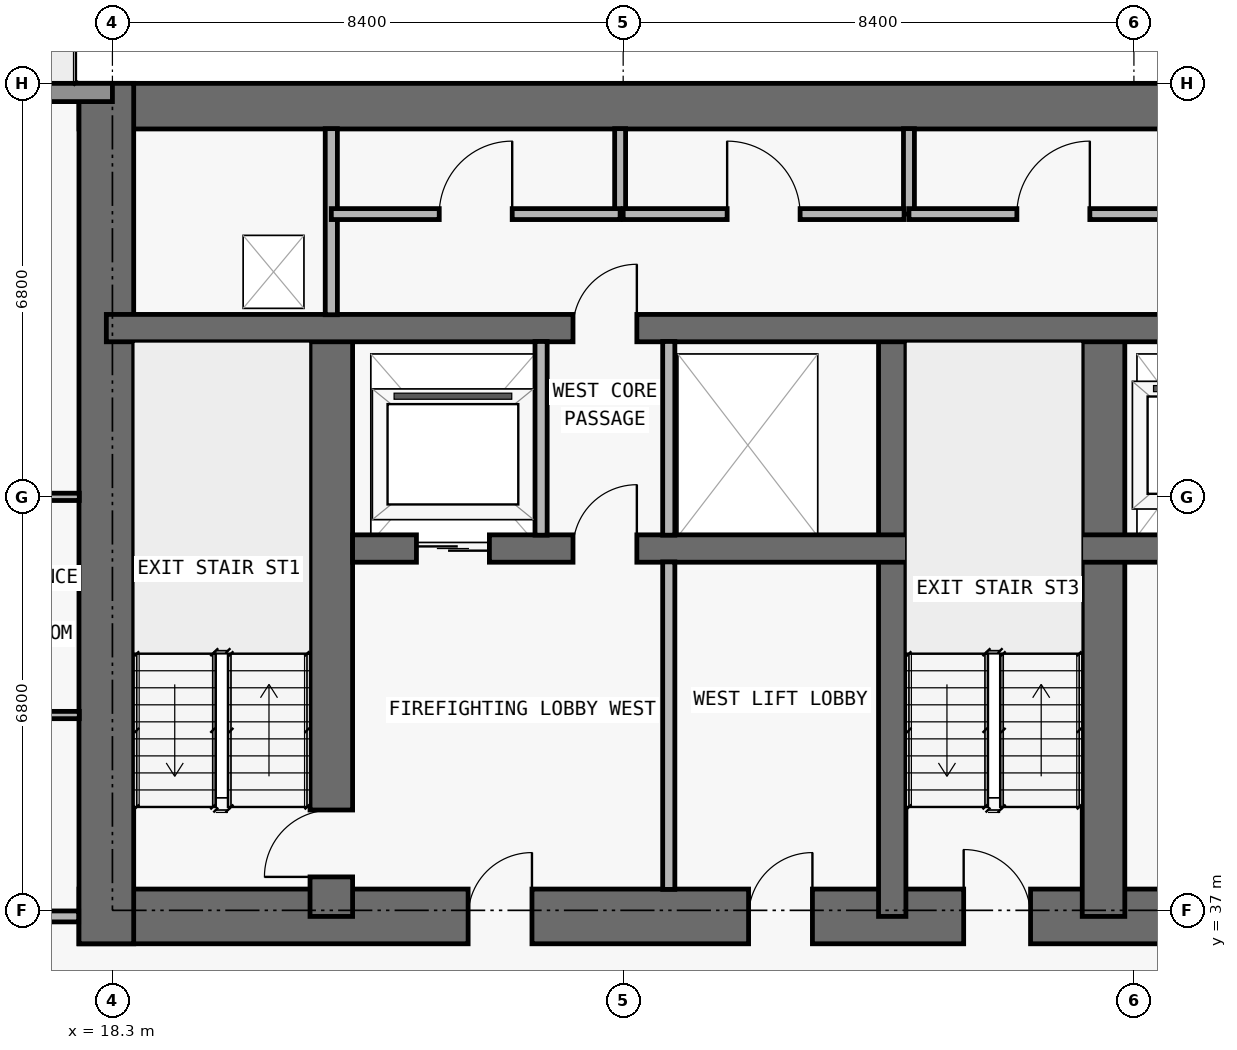
"""IFC4 building model, lengths in metres.
Left out: names, types, materials, properties, quantities, classifications, styles, units other than length and angle.
Written with IfcOpenShell. Run it as: python <this file> out.ifc"""

import sys

from ifc_helpers import new_model, si_unit, direction, frame, frame_2d, origin, place, context, subcontext, project, spatial, rectangle, extrude, element, fill, save


model = new_model("IFC4")
c1 = context("Model", 3, precision=1e-05, world=origin(), true_north=direction((0.0, 1.0)))
c2 = subcontext(c1, "Body", "Model", "MODEL_VIEW")
j1 = project(units=[si_unit("LENGTHUNIT", "METRE"), si_unit("PLANEANGLEUNIT", "RADIAN")], contexts=[c1])
p1 = place(None, origin())
s1 = spatial("IfcSite", under=j1, at=p1, CompositionType="ELEMENT")
p2 = place(p1, origin())
s2 = spatial("IfcBuilding", under=s1, at=p2, CompositionType="ELEMENT")
p3 = place(p2, frame((0.0, 0.0, 46.5)))
s3 = spatial("IfcBuildingStorey", under=s2, at=p3, CompositionType="ELEMENT", Elevation=46.5)
p4 = place(p3, frame((17.75, 36.9, 0.0), z_axis=(0.0, 0.0, 1.0), x_axis=(1.0, 0.0, 0.0)))
e1 = element("IfcWall", 1, at=p4, inside=s3, PredefinedType="SHEAR", context=c2, shape_type="SweptSolid", body=[
    extrude(rectangle(XDim=42.3, YDim=0.9, at=frame_2d((21.15, 0.0))), origin(), (0.0, 0.0, 1.0), 3.05),
])
p5 = place(p4, frame((14.55, 0.0, 0.0)))
e2 = element("IfcOpeningElement", 2, at=p5, cuts=e1, PredefinedType="OPENING", context=c2, shape_type="SweptSolid", body=[
    extrude(rectangle(XDim=1.1, YDim=2.15, at=frame_2d((0.55, 1.075))), frame((0.0, 0.46, 0.0), z_axis=(0.0, -1.0, 0.0), x_axis=(1.0, 0.0, 0.0)), (0.0, 0.0, 1.0), 0.92),
])
p6 = place(p4, frame((6.4, 0.0, 0.0)))
e3 = element("IfcOpeningElement", 3, at=p6, cuts=e1, PredefinedType="OPENING", context=c2, shape_type="SweptSolid", body=[
    extrude(rectangle(XDim=1.05, YDim=2.15, at=frame_2d((0.525, 1.075))), frame((0.0, 0.46, 0.0), z_axis=(0.0, -1.0, 0.0), x_axis=(1.0, 0.0, 0.0)), (0.0, 0.0, 1.0), 0.92),
])
p7 = place(p4, frame((34.9, 0.0, 0.0)))
e4 = element("IfcOpeningElement", 4, at=p7, cuts=e1, PredefinedType="OPENING", context=c2, shape_type="SweptSolid", body=[
    extrude(rectangle(XDim=1.05, YDim=2.15, at=frame_2d((0.525, 1.075))), frame((0.0, 0.46, 0.0), z_axis=(0.0, -1.0, 0.0), x_axis=(1.0, 0.0, 0.0)), (0.0, 0.0, 1.0), 0.92),
])
p8 = place(p4, frame((11.012, 0.0, 0.0)))
e5 = element("IfcOpeningElement", 5, at=p8, cuts=e1, PredefinedType="OPENING", context=c2, shape_type="SweptSolid", body=[
    extrude(rectangle(XDim=1.05, YDim=2.15, at=frame_2d((0.525, 1.075))), frame((0.0, 0.46, 0.0), z_axis=(0.0, -1.0, 0.0), x_axis=(1.0, 0.0, 0.0)), (0.0, 0.0, 1.0), 0.92),
])
p9 = place(p4, frame((24.25, 0.0, 0.0)))
e6 = element("IfcOpeningElement", 6, at=p9, cuts=e1, PredefinedType="OPENING", context=c2, shape_type="SweptSolid", body=[
    extrude(rectangle(XDim=1.05, YDim=2.15, at=frame_2d((0.525, 1.075))), frame((0.0, 0.46, 0.0), z_axis=(0.0, -1.0, 0.0), x_axis=(1.0, 0.0, 0.0)), (0.0, 0.0, 1.0), 0.92),
])
p10 = place(p3, frame((17.75, 50.225, 0.0), z_axis=(0.0, 0.0, 1.0), x_axis=(1.0, 0.0, 0.0)))
e7 = element("IfcWall", 7, at=p10, inside=s3, PredefinedType="SHEAR", context=c2, shape_type="SweptSolid", body=[
    extrude(rectangle(XDim=42.3, YDim=0.75, at=frame_2d((21.15, 0.0))), origin(), (0.0, 0.0, 1.0), 3.05),
])
p11 = place(p3, frame((18.2, 36.45, 0.0), z_axis=(0.0, 0.0, 1.0), x_axis=(0.0, 1.0, 0.0)))
e8 = element("IfcWall", 8, at=p11, inside=s3, PredefinedType="SHEAR", context=c2, shape_type="SweptSolid", body=[
    extrude(rectangle(XDim=14.15, YDim=0.9, at=frame_2d((7.075, 0.0))), origin(), (0.0, 0.0, 1.0), 3.05),
])
p12 = place(p3, frame((21.9, 36.9, 0.0), z_axis=(0.0, 0.0, 1.0), x_axis=(0.0, 1.0, 0.0)))
e9 = element("IfcWall", 9, at=p12, inside=s3, PredefinedType="SHEAR", context=c2, shape_type="SweptSolid", body=[
    extrude(rectangle(XDim=9.675, YDim=0.7, at=frame_2d((4.837, 0.0))), origin(), (0.0, 0.0, 1.0), 3.05),
])
p13 = place(p12, frame((0.65, 0.0, 0.0)))
e10 = element("IfcOpeningElement", 10, at=p13, cuts=e9, PredefinedType="OPENING", context=c2, shape_type="SweptSolid", body=[
    extrude(rectangle(XDim=1.1, YDim=2.15, at=frame_2d((0.55, 1.075))), frame((0.0, 0.36, 0.0), z_axis=(0.0, -1.0, 0.0), x_axis=(1.0, 0.0, 0.0)), (0.0, 0.0, 1.0), 0.72),
])
p14 = place(p3, frame((31.125, 36.9, 0.0), z_axis=(0.0, 0.0, 1.0), x_axis=(0.0, 1.0, 0.0)))
e11 = element("IfcWall", 11, at=p14, inside=s3, PredefinedType="SHEAR", context=c2, shape_type="SweptSolid", body=[
    extrude(rectangle(XDim=9.675, YDim=0.45, at=frame_2d((4.837, 0.0))), origin(), (0.0, 0.0, 1.0), 3.05),
])
p15 = place(p3, frame((34.6, 36.9, 0.0), z_axis=(0.0, 0.0, 1.0), x_axis=(0.0, 1.0, 0.0)))
e12 = element("IfcWall", 12, at=p15, inside=s3, PredefinedType="SHEAR", context=c2, shape_type="SweptSolid", body=[
    extrude(rectangle(XDim=9.675, YDim=0.7, at=frame_2d((4.837, 0.0))), origin(), (0.0, 0.0, 1.0), 3.05),
])
p16 = place(p3, frame((22.25, 42.95, 0.0), z_axis=(0.0, 0.0, 1.0), x_axis=(1.0, 0.0, 0.0)))
e13 = element("IfcWall", 13, at=p16, inside=s3, PredefinedType="SHEAR", context=c2, shape_type="SweptSolid", body=[
    extrude(rectangle(XDim=33.3, YDim=0.45, at=frame_2d((16.65, 0.0))), origin(), (0.0, 0.0, 1.0), 3.05),
])
p17 = place(p16, frame((1.05, 0.0, 0.0)))
e14 = element("IfcOpeningElement", 14, at=p17, cuts=e13, PredefinedType="OPENING", context=c2, shape_type="SweptSolid", body=[
    extrude(rectangle(XDim=1.2, YDim=2.2, at=frame_2d((0.6, 1.1))), frame((0.0, 0.235, 0.0), z_axis=(0.0, -1.0, 0.0), x_axis=(1.0, 0.0, 0.0)), (0.0, 0.0, 1.0), 0.47),
])
p18 = place(p16, frame((31.05, 0.0, 0.0)))
e15 = element("IfcOpeningElement", 15, at=p18, cuts=e13, PredefinedType="OPENING", context=c2, shape_type="SweptSolid", body=[
    extrude(rectangle(XDim=1.2, YDim=2.2, at=frame_2d((0.6, 1.1))), frame((0.0, 0.235, 0.0), z_axis=(0.0, -1.0, 0.0), x_axis=(1.0, 0.0, 0.0)), (0.0, 0.0, 1.0), 0.47),
])
p19 = place(p16, frame((13.5, 0.0, 0.0)))
e16 = element("IfcOpeningElement", 16, at=p19, cuts=e13, PredefinedType="OPENING", context=c2, shape_type="SweptSolid", body=[
    extrude(rectangle(XDim=1.1, YDim=2.2, at=frame_2d((0.55, 1.1))), frame((0.0, 0.235, 0.0), z_axis=(0.0, -1.0, 0.0), x_axis=(1.0, 0.0, 0.0)), (0.0, 0.0, 1.0), 0.47),
])
p20 = place(p16, frame((16.1, 0.0, 0.0)))
e17 = element("IfcOpeningElement", 17, at=p20, cuts=e13, PredefinedType="OPENING", context=c2, shape_type="SweptSolid", body=[
    extrude(rectangle(XDim=1.1, YDim=2.2, at=frame_2d((0.55, 1.1))), frame((0.0, 0.235, 0.0), z_axis=(0.0, -1.0, 0.0), x_axis=(1.0, 0.0, 0.0)), (0.0, 0.0, 1.0), 0.47),
])
p21 = place(p16, frame((18.7, 0.0, 0.0)))
e18 = element("IfcOpeningElement", 18, at=p21, cuts=e13, PredefinedType="OPENING", context=c2, shape_type="SweptSolid", body=[
    extrude(rectangle(XDim=1.1, YDim=2.2, at=frame_2d((0.55, 1.1))), frame((0.0, 0.235, 0.0), z_axis=(0.0, -1.0, 0.0), x_axis=(1.0, 0.0, 0.0)), (0.0, 0.0, 1.0), 0.47),
])
p22 = place(p16, frame((3.625, 0.0, 0.0)))
e19 = element("IfcOpeningElement", 19, at=p22, cuts=e13, PredefinedType="OPENING", context=c2, shape_type="SweptSolid", body=[
    extrude(rectangle(XDim=1.05, YDim=2.15, at=frame_2d((0.525, 1.075))), frame((0.0, 0.235, 0.0), z_axis=(0.0, -1.0, 0.0), x_axis=(1.0, 0.0, 0.0)), (0.0, 0.0, 1.0), 0.47),
])
p23 = place(p16, frame((28.675, 0.0, 0.0)))
e20 = element("IfcOpeningElement", 20, at=p23, cuts=e13, PredefinedType="OPENING", context=c2, shape_type="SweptSolid", body=[
    extrude(rectangle(XDim=1.05, YDim=2.15, at=frame_2d((0.525, 1.075))), frame((0.0, 0.235, 0.0), z_axis=(0.0, -1.0, 0.0), x_axis=(1.0, 0.0, 0.0)), (0.0, 0.0, 1.0), 0.47),
])
p24 = place(p3, frame((18.2, 46.575, 0.0), z_axis=(0.0, 0.0, 1.0), x_axis=(1.0, 0.0, 0.0)))
e21 = element("IfcWall", 21, at=p24, inside=s3, PredefinedType="SHEAR", context=c2, shape_type="SweptSolid", body=[
    extrude(rectangle(XDim=41.4, YDim=0.45, at=frame_2d((20.7, 0.0))), origin(), (0.0, 0.0, 1.0), 3.05),
])
p25 = place(p24, frame((7.675, 0.0, 0.0)))
e22 = element("IfcOpeningElement", 22, at=p25, cuts=e21, PredefinedType="OPENING", context=c2, shape_type="SweptSolid", body=[
    extrude(rectangle(XDim=1.05, YDim=2.15, at=frame_2d((0.525, 1.075))), frame((0.0, 0.235, 0.0), z_axis=(0.0, -1.0, 0.0), x_axis=(1.0, 0.0, 0.0)), (0.0, 0.0, 1.0), 0.47),
])
p26 = place(p24, frame((32.725, 0.0, 0.0)))
e23 = element("IfcOpeningElement", 23, at=p26, cuts=e21, PredefinedType="OPENING", context=c2, shape_type="SweptSolid", body=[
    extrude(rectangle(XDim=1.05, YDim=2.15, at=frame_2d((0.525, 1.075))), frame((0.0, 0.235, 0.0), z_axis=(0.0, -1.0, 0.0), x_axis=(1.0, 0.0, 0.0)), (0.0, 0.0, 1.0), 0.47),
])
p27 = place(p3, frame((5.1, 50.45, 0.0), z_axis=(0.0, 0.0, 1.0), x_axis=(1.0, 0.0, 0.0)))
e24 = element("IfcWall", 24, at=p27, inside=s3, PredefinedType="STANDARD", context=c2, shape_type="SweptSolid", body=[
    extrude(rectangle(XDim=13.2, YDim=0.3, at=frame_2d((6.6, 0.0))), origin(), (0.0, 0.0, 1.0), 3.05),
])
p28 = place(p27, frame((5.6, 0.0, 0.0)))
e25 = element("IfcOpeningElement", 25, at=p28, cuts=e24, PredefinedType="OPENING", context=c2, shape_type="SweptSolid", body=[
    extrude(rectangle(XDim=2.0, YDim=2.3, at=frame_2d((1.0, 1.15))), frame((0.0, 0.16, 0.0), z_axis=(0.0, -1.0, 0.0), x_axis=(1.0, 0.0, 0.0)), (0.0, 0.0, 1.0), 0.32),
])
p29 = place(p3, frame((21.9, 46.795, 0.0), z_axis=(0.0, 0.0, 1.0), x_axis=(0.0, 1.0, 0.0)))
e26 = element("IfcWall", 26, at=p29, inside=s3, PredefinedType="PARTITIONING", context=c2, shape_type="SweptSolid", body=[
    extrude(rectangle(XDim=3.06, YDim=0.2, at=frame_2d((1.53, 0.0))), origin(), (0.0, 0.0, 1.0), 3.05),
])
p30 = place(p3, frame((25.35, 43.17, 0.0), z_axis=(0.0, 0.0, 1.0), x_axis=(0.0, 1.0, 0.0)))
e27 = element("IfcWall", 27, at=p30, inside=s3, PredefinedType="PARTITIONING", context=c2, shape_type="SweptSolid", body=[
    extrude(rectangle(XDim=3.185, YDim=0.2, at=frame_2d((1.593, 0.0))), origin(), (0.0, 0.0, 1.0), 3.05),
])
p31 = place(p3, frame((26.65, 48.45, 0.0), z_axis=(0.0, 0.0, 1.0), x_axis=(0.0, 1.0, 0.0)))
e28 = element("IfcWall", 28, at=p31, inside=s3, PredefinedType="PARTITIONING", context=c2, shape_type="SweptSolid", body=[
    extrude(rectangle(XDim=1.405, YDim=0.18, at=frame_2d((0.703, 0.0))), origin(), (0.0, 0.0, 1.0), 3.05),
])
p32 = place(p3, frame((27.45, 37.345, 0.0), z_axis=(0.0, 0.0, 1.0), x_axis=(0.0, 1.0, 0.0)))
e29 = element("IfcWall", 29, at=p32, inside=s3, PredefinedType="PARTITIONING", context=c2, shape_type="SweptSolid", body=[
    extrude(rectangle(XDim=5.385, YDim=0.2, at=frame_2d((2.692, 0.0))), origin(), (0.0, 0.0, 1.0), 3.05),
])
p33 = place(p3, frame((27.45, 43.17, 0.0), z_axis=(0.0, 0.0, 1.0), x_axis=(0.0, 1.0, 0.0)))
e30 = element("IfcWall", 30, at=p33, inside=s3, PredefinedType="PARTITIONING", context=c2, shape_type="SweptSolid", body=[
    extrude(rectangle(XDim=3.185, YDim=0.2, at=frame_2d((1.593, 0.0))), origin(), (0.0, 0.0, 1.0), 3.05),
])
p34 = place(p3, frame((31.4, 48.45, 0.0), z_axis=(0.0, 0.0, 1.0), x_axis=(0.0, 1.0, 0.0)))
e31 = element("IfcWall", 31, at=p34, inside=s3, PredefinedType="PARTITIONING", context=c2, shape_type="SweptSolid", body=[
    extrude(rectangle(XDim=1.405, YDim=0.18, at=frame_2d((0.703, 0.0))), origin(), (0.0, 0.0, 1.0), 3.05),
])
p35 = place(p3, frame((5.1, 36.9, 0.0), z_axis=(0.0, 0.0, 1.0), x_axis=(1.0, 0.0, 0.0)))
e32 = element("IfcWall", 32, at=p35, inside=s3, PredefinedType="PARTITIONING", context=c2, shape_type="SweptSolid", body=[
    extrude(rectangle(XDim=12.645, YDim=0.18, at=frame_2d((6.323, 0.0))), origin(), (0.0, 0.0, 1.0), 3.05),
])
p36 = place(p35, frame((7.125, 0.0, 0.0)))
e33 = element("IfcOpeningElement", 33, at=p36, cuts=e32, PredefinedType="OPENING", context=c2, shape_type="SweptSolid", body=[
    extrude(rectangle(XDim=1.0, YDim=2.2, at=frame_2d((0.5, 1.1))), frame((0.0, 0.1, 0.0), z_axis=(0.0, -1.0, 0.0), x_axis=(1.0, 0.0, 0.0)), (0.0, 0.0, 1.0), 0.2),
])
p37 = place(p3, frame((15.55, 40.212, 0.0), z_axis=(0.0, 0.0, 1.0), x_axis=(1.0, 0.0, 0.0)))
e34 = element("IfcWall", 34, at=p37, inside=s3, PredefinedType="PARTITIONING", context=c2, shape_type="SweptSolid", body=[
    extrude(rectangle(XDim=2.205, YDim=0.12, at=frame_2d((1.103, 0.0))), origin(), (0.0, 0.0, 1.0), 3.05),
])
p38 = place(p3, frame((1.795, 43.8, 0.0), z_axis=(0.0, 0.0, 1.0), x_axis=(1.0, 0.0, 0.0)))
e35 = element("IfcWall", 35, at=p38, inside=s3, PredefinedType="PARTITIONING", context=c2, shape_type="SweptSolid", body=[
    extrude(rectangle(XDim=15.96, YDim=0.12, at=frame_2d((7.98, 0.0))), origin(), (0.0, 0.0, 1.0), 2.339),
])
p39 = place(p38, frame((5.255, 0.0, 0.0)))
e36 = element("IfcOpeningElement", 36, at=p39, cuts=e35, PredefinedType="OPENING", context=c2, shape_type="SweptSolid", body=[
    extrude(rectangle(XDim=0.9, YDim=2.15, at=frame_2d((0.45, 1.075))), frame((0.0, 0.07, 0.0), z_axis=(0.0, -1.0, 0.0), x_axis=(1.0, 0.0, 0.0)), (0.0, 0.0, 1.0), 0.14),
])
p40 = place(p38, frame((10.48, 0.0, 0.0)))
e37 = element("IfcOpeningElement", 37, at=p40, cuts=e35, PredefinedType="OPENING", context=c2, shape_type="SweptSolid", body=[
    extrude(rectangle(XDim=0.9, YDim=2.15, at=frame_2d((0.45, 1.075))), frame((0.0, 0.07, 0.0), z_axis=(0.0, -1.0, 0.0), x_axis=(1.0, 0.0, 0.0)), (0.0, 0.0, 1.0), 0.14),
])
p41 = place(p38, frame((14.433, 0.0, 0.0)))
e38 = element("IfcOpeningElement", 38, at=p41, cuts=e35, PredefinedType="OPENING", context=c2, shape_type="SweptSolid", body=[
    extrude(rectangle(XDim=0.85, YDim=2.1, at=frame_2d((0.425, 1.05))), frame((0.0, 0.07, 0.0), z_axis=(0.0, -1.0, 0.0), x_axis=(1.0, 0.0, 0.0)), (0.0, 0.0, 1.0), 0.14),
])
p42 = place(p3, frame((21.9, 48.45, 0.0), z_axis=(0.0, 0.0, 1.0), x_axis=(1.0, 0.0, 0.0)))
e39 = element("IfcWall", 39, at=p42, inside=s3, PredefinedType="PARTITIONING", context=c2, shape_type="SweptSolid", body=[
    extrude(rectangle(XDim=4.75, YDim=0.18, at=frame_2d((2.375, 0.0))), origin(), (0.0, 0.0, 1.0), 3.05),
])
p43 = place(p42, frame((1.775, 0.0, 0.0)))
e40 = element("IfcOpeningElement", 40, at=p43, cuts=e39, PredefinedType="OPENING", context=c2, shape_type="SweptSolid", body=[
    extrude(rectangle(XDim=1.2, YDim=2.2, at=frame_2d((0.6, 1.1))), frame((0.0, 0.1, 0.0), z_axis=(0.0, -1.0, 0.0), x_axis=(1.0, 0.0, 0.0)), (0.0, 0.0, 1.0), 0.2),
])
p44 = place(p3, frame((26.7, 48.45, 0.0), z_axis=(0.0, 0.0, 1.0), x_axis=(1.0, 0.0, 0.0)))
e41 = element("IfcWall", 41, at=p44, inside=s3, PredefinedType="PARTITIONING", context=c2, shape_type="SweptSolid", body=[
    extrude(rectangle(XDim=4.62, YDim=0.18, at=frame_2d((2.31, 0.0))), origin(), (0.0, 0.0, 1.0), 3.05),
])
p45 = place(p44, frame((1.71, 0.0, 0.0)))
e42 = element("IfcOpeningElement", 42, at=p45, cuts=e41, PredefinedType="OPENING", context=c2, shape_type="SweptSolid", body=[
    extrude(rectangle(XDim=1.2, YDim=2.2, at=frame_2d((0.6, 1.1))), frame((0.0, 0.1, 0.0), z_axis=(0.0, -1.0, 0.0), x_axis=(1.0, 0.0, 0.0)), (0.0, 0.0, 1.0), 0.2),
])
p46 = place(p3, frame((31.4, 48.45, 0.0), z_axis=(0.0, 0.0, 1.0), x_axis=(1.0, 0.0, 0.0)))
e43 = element("IfcWall", 43, at=p46, inside=s3, PredefinedType="PARTITIONING", context=c2, shape_type="SweptSolid", body=[
    extrude(rectangle(XDim=24.5, YDim=0.18, at=frame_2d((12.25, 0.0))), origin(), (0.0, 0.0, 1.0), 3.05),
])
p47 = place(p46, frame((1.775, 0.0, 0.0)))
e44 = element("IfcOpeningElement", 44, at=p47, cuts=e43, PredefinedType="OPENING", context=c2, shape_type="SweptSolid", body=[
    extrude(rectangle(XDim=1.2, YDim=2.2, at=frame_2d((0.6, 1.1))), frame((0.0, 0.1, 0.0), z_axis=(0.0, -1.0, 0.0), x_axis=(1.0, 0.0, 0.0)), (0.0, 0.0, 1.0), 0.2),
])
p48 = place(p46, frame((9.35, 0.0, 0.0)))
e45 = element("IfcOpeningElement", 45, at=p48, cuts=e43, PredefinedType="OPENING", context=c2, shape_type="SweptSolid", body=[
    extrude(rectangle(XDim=1.0, YDim=2.2, at=frame_2d((0.5, 1.1))), frame((0.0, 0.1, 0.0), z_axis=(0.0, -1.0, 0.0), x_axis=(1.0, 0.0, 0.0)), (0.0, 0.0, 1.0), 0.2),
])
p49 = place(p46, frame((16.725, 0.0, 0.0)))
e46 = element("IfcOpeningElement", 46, at=p49, cuts=e43, PredefinedType="OPENING", context=c2, shape_type="SweptSolid", body=[
    extrude(rectangle(XDim=1.2, YDim=2.2, at=frame_2d((0.6, 1.1))), frame((0.0, 0.1, 0.0), z_axis=(0.0, -1.0, 0.0), x_axis=(1.0, 0.0, 0.0)), (0.0, 0.0, 1.0), 0.2),
])
p50 = place(p46, frame((21.675, 0.0, 0.0)))
e47 = element("IfcOpeningElement", 47, at=p50, cuts=e43, PredefinedType="OPENING", context=c2, shape_type="SweptSolid", body=[
    extrude(rectangle(XDim=0.85, YDim=2.1, at=frame_2d((0.425, 1.05))), frame((0.0, 0.1, 0.0), z_axis=(0.0, -1.0, 0.0), x_axis=(1.0, 0.0, 0.0)), (0.0, 0.0, 1.0), 0.2),
])
p51 = place(p17, origin())
e48 = element("IfcDoor", 48, at=p51, inside=s3, OperationType="DOUBLE_DOOR_SLIDING", PredefinedType="DOOR", context=c2, shape_type="SweptSolid", body=[
    extrude(rectangle(XDim=1.2, YDim=2.2, at=frame_2d((0.6, 1.1))), frame((0.0, 0.025, 0.0), z_axis=(0.0, -1.0, 0.0), x_axis=(1.0, 0.0, 0.0)), (0.0, 0.0, 1.0), 0.05),
])
fill(e14, e48)
p52 = place(p5, origin())
e49 = element("IfcDoor", 49, at=p52, inside=s3, OperationType="SINGLE_SWING_LEFT", PredefinedType="DOOR", context=c2, shape_type="SweptSolid", body=[
    extrude(rectangle(XDim=1.1, YDim=2.15, at=frame_2d((0.55, 1.075))), frame((0.0, 0.025, 0.0), z_axis=(0.0, -1.0, 0.0), x_axis=(1.0, 0.0, 0.0)), (0.0, 0.0, 1.0), 0.05),
])
fill(e2, e49)
p53 = place(p6, origin())
e50 = element("IfcDoor", 50, at=p53, inside=s3, OperationType="SINGLE_SWING_RIGHT", PredefinedType="DOOR", context=c2, shape_type="SweptSolid", body=[
    extrude(rectangle(XDim=1.05, YDim=2.15, at=frame_2d((0.525, 1.075))), frame((0.0, 0.025, 0.0), z_axis=(0.0, -1.0, 0.0), x_axis=(1.0, 0.0, 0.0)), (0.0, 0.0, 1.0), 0.05),
])
fill(e3, e50)
p54 = place(p13, origin())
e51 = element("IfcDoor", 51, at=p54, inside=s3, OperationType="SINGLE_SWING_LEFT", PredefinedType="DOOR", context=c2, shape_type="SweptSolid", body=[
    extrude(rectangle(XDim=1.1, YDim=2.15, at=frame_2d((0.55, 1.075))), frame((0.0, 0.025, 0.0), z_axis=(0.0, -1.0, 0.0), x_axis=(1.0, 0.0, 0.0)), (0.0, 0.0, 1.0), 0.05),
])
fill(e10, e51)
p55 = place(p22, origin())
e52 = element("IfcDoor", 52, at=p55, inside=s3, OperationType="SINGLE_SWING_RIGHT", PredefinedType="DOOR", context=c2, shape_type="SweptSolid", body=[
    extrude(rectangle(XDim=1.05, YDim=2.15, at=frame_2d((0.525, 1.075))), frame((0.0, 0.025, 0.0), z_axis=(0.0, -1.0, 0.0), x_axis=(1.0, 0.0, 0.0)), (0.0, 0.0, 1.0), 0.05),
])
fill(e19, e52)
p56 = place(p8, origin())
e53 = element("IfcDoor", 53, at=p56, inside=s3, OperationType="SINGLE_SWING_RIGHT", PredefinedType="DOOR", context=c2, shape_type="SweptSolid", body=[
    extrude(rectangle(XDim=1.05, YDim=2.15, at=frame_2d((0.525, 1.075))), frame((0.0, 0.025, 0.0), z_axis=(0.0, -1.0, 0.0), x_axis=(1.0, 0.0, 0.0)), (0.0, 0.0, 1.0), 0.05),
])
fill(e5, e53)
p57 = place(p25, origin())
e54 = element("IfcDoor", 54, at=p57, inside=s3, OperationType="SINGLE_SWING_RIGHT", PredefinedType="DOOR", context=c2, shape_type="SweptSolid", body=[
    extrude(rectangle(XDim=1.05, YDim=2.15, at=frame_2d((0.525, 1.075))), frame((0.0, 0.025, 0.0), z_axis=(0.0, -1.0, 0.0), x_axis=(1.0, 0.0, 0.0)), (0.0, 0.0, 1.0), 0.05),
])
fill(e22, e54)
p58 = place(p43, origin())
e55 = element("IfcDoor", 55, at=p58, inside=s3, OperationType="SINGLE_SWING_RIGHT", PredefinedType="DOOR", context=c2, shape_type="SweptSolid", body=[
    extrude(rectangle(XDim=1.2, YDim=2.2, at=frame_2d((0.6, 1.1))), frame((0.0, 0.025, 0.0), z_axis=(0.0, -1.0, 0.0), x_axis=(1.0, 0.0, 0.0)), (0.0, 0.0, 1.0), 0.05),
])
fill(e40, e55)
p59 = place(p45, origin())
e56 = element("IfcDoor", 56, at=p59, inside=s3, OperationType="SINGLE_SWING_LEFT", PredefinedType="DOOR", context=c2, shape_type="SweptSolid", body=[
    extrude(rectangle(XDim=1.2, YDim=2.2, at=frame_2d((0.6, 1.1))), frame((0.0, 0.025, 0.0), z_axis=(0.0, -1.0, 0.0), x_axis=(1.0, 0.0, 0.0)), (0.0, 0.0, 1.0), 0.05),
])
fill(e42, e56)
p60 = place(p47, origin())
e57 = element("IfcDoor", 57, at=p60, inside=s3, OperationType="SINGLE_SWING_RIGHT", PredefinedType="DOOR", context=c2, shape_type="SweptSolid", body=[
    extrude(rectangle(XDim=1.2, YDim=2.2, at=frame_2d((0.6, 1.1))), frame((0.0, 0.025, 0.0), z_axis=(0.0, -1.0, 0.0), x_axis=(1.0, 0.0, 0.0)), (0.0, 0.0, 1.0), 0.05),
])
fill(e44, e57)
save(model, sys.argv[1])
